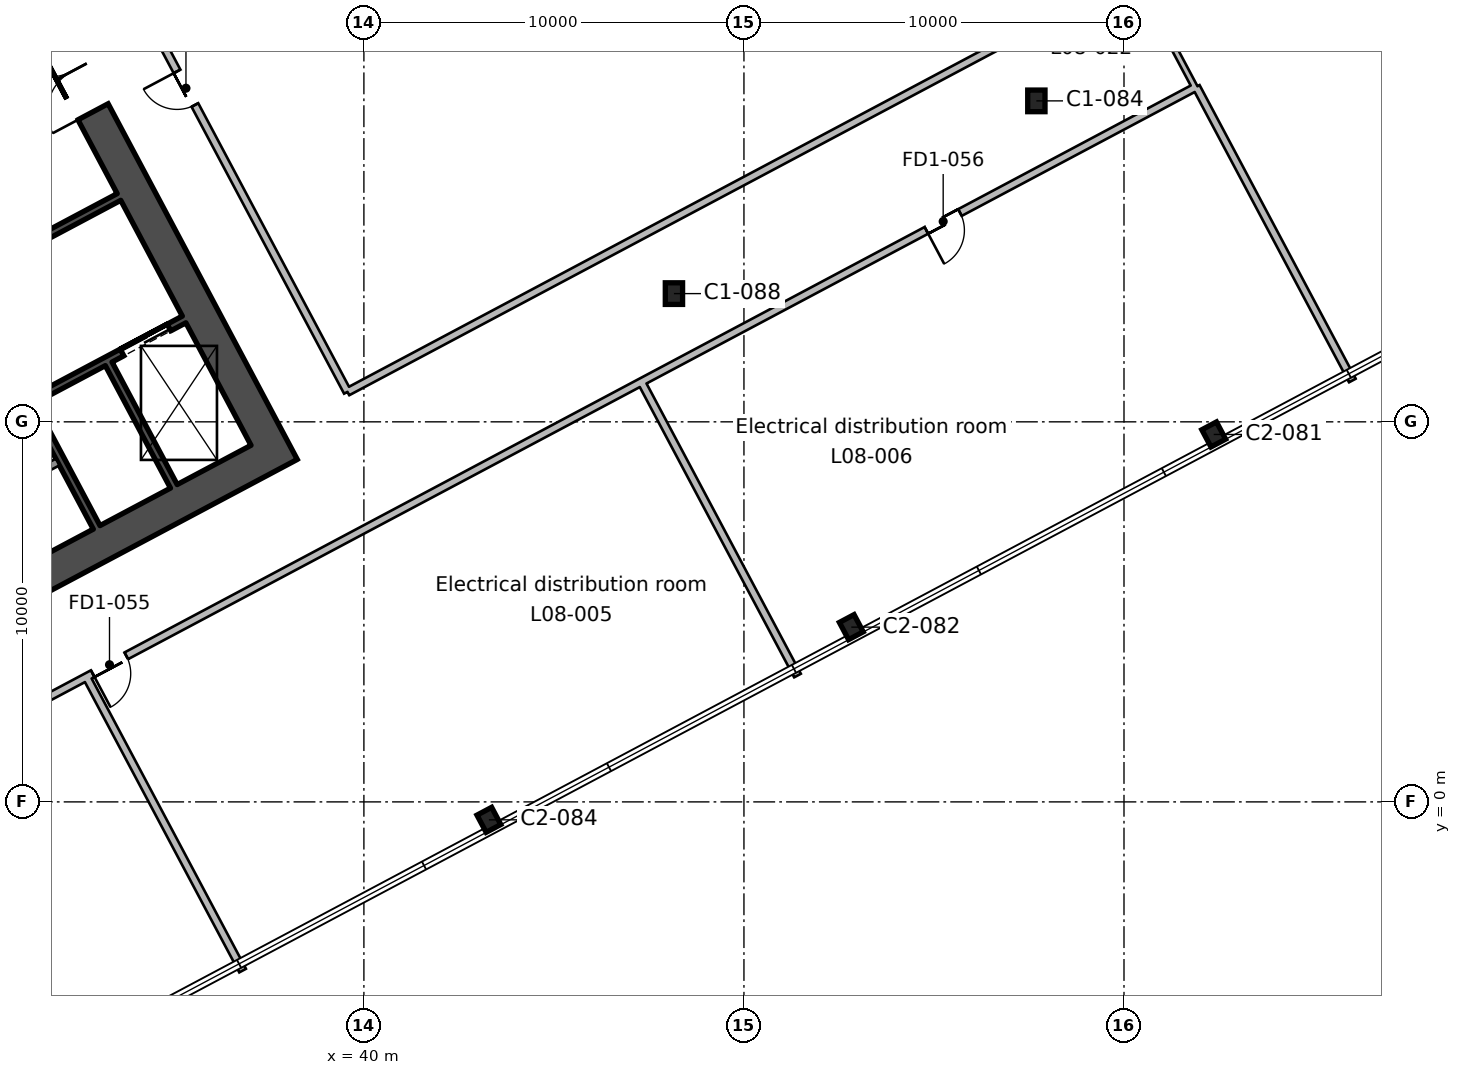
"""IFC4 building model, lengths in metres.
Left out: names, types, materials, properties, quantities, classifications, styles, units other than length and angle.
Written with IfcOpenShell. Run it as: python <this file> out.ifc"""

import sys

from ifc_helpers import new_model, si_unit, direction, frame, frame_2d, origin, origin_2d, place, context, subcontext, project, spatial, rectangle, i_section, extrude, element, fill, save


model = new_model("IFC4")
c1 = context("Model", 3, precision=1e-05, world=origin(), true_north=direction((0.0, 1.0)))
c2 = subcontext(c1, "Body", "Model", "MODEL_VIEW")
j1 = project(units=[si_unit("LENGTHUNIT", "METRE"), si_unit("PLANEANGLEUNIT", "RADIAN")], contexts=[c1])
p1 = place(None, origin())
s1 = spatial("IfcSite", under=j1, at=p1, CompositionType="ELEMENT")
p2 = place(p1, origin())
s2 = spatial("IfcBuilding", under=s1, at=p2, CompositionType="ELEMENT")
p3 = place(p2, frame((0.0, 0.0, 44.6)))
s3 = spatial("IfcBuildingStorey", under=s2, at=p3, CompositionType="ELEMENT", Elevation=44.6)
for number, where, z_axis, x_axis in (
    (1, (43.289, -0.472, 0.0), (0.0, 0.0, 1.0), (0.883, 0.469, 0.0)),
    (2, (52.825, 4.598, 0.0), (0.0, 0.0, 1.0), (0.883, 0.469, 0.0)),
    (3, (62.361, 9.668, 0.0), (0.0, 0.0, 1.0), (0.883, 0.469, 0.0)),
):
    element("IfcColumn", number, at=place(p3, frame(where, z_axis=z_axis, x_axis=x_axis)), inside=s3, PredefinedType="COLUMN", context=c2, shape_type="SweptSolid", body=[
        extrude(i_section(OverallWidth=0.437, OverallDepth=0.513, WebThickness=0.061, FlangeThickness=0.097, FilletRadius=0.015, at=origin_2d()), origin(), (0.0, 0.0, 1.0), 5.4),
    ])
for number, where, z_axis, x_axis in (
    (4, (48.158, 13.374, 0.0), (0.0, 0.0, 1.0), (1.0, 0.0, 0.0)),
    (5, (57.694, 18.445, 0.0), (0.0, 0.0, 1.0), (1.0, 0.0, 0.0)),
):
    element("IfcColumn", number, at=place(p3, frame(where, z_axis=z_axis, x_axis=x_axis)), inside=s3, PredefinedType="COLUMN", context=c2, shape_type="SweptSolid", body=[
        extrude(i_section(OverallWidth=0.455, OverallDepth=0.569, WebThickness=0.078, FlangeThickness=0.125, FilletRadius=0.015, at=origin_2d()), origin(), (0.0, 0.0, 1.0), 5.4),
    ])
p4 = place(p3, frame((37.849, 8.799, 0.0), z_axis=(0.0, 0.0, 1.0), x_axis=(-0.469465789982, 0.882950662289, 0.0)))
e6 = element("IfcWall", 6, at=p4, inside=s3, PredefinedType="SHEAR", context=c2, shape_type="SweptSolid", body=[
    extrude(rectangle(XDim=20.0, YDim=0.9, at=frame_2d((10.0, 0.0))), origin(), (0.0, 0.0, 1.0), 5.4),
])
p5 = place(p4, frame((10.6, 0.0, 0.0)))
e7 = element("IfcOpeningElement", 7, at=p5, cuts=e6, PredefinedType="OPENING", context=c2, shape_type="SweptSolid", body=[
    extrude(rectangle(XDim=2.4, YDim=2.4, at=frame_2d((1.2, 1.2))), frame((0.0, 0.46, 0.0), z_axis=(0.0, -1.0, 0.0), x_axis=(1.0, 0.0, 0.0)), (0.0, 0.0, 1.0), 0.92),
])
p6 = place(p3, frame((19.405, -0.498, 0.0), z_axis=(0.0, 0.0, 1.0), x_axis=(0.88294509198, 0.469476266226, 0.0)))
e8 = element("IfcWall", 8, at=p6, inside=s3, PredefinedType="SHEAR", context=c2, shape_type="SweptSolid", body=[
    extrude(rectangle(XDim=20.2, YDim=0.9, at=frame_2d((10.1, 0.0))), origin(), (0.0, 0.0, 1.0), 5.4),
])
p7 = place(p3, frame((32.968, 7.223, 0.0), z_axis=(0.0, 0.0, 1.0), x_axis=(-0.469480409012, 0.88294288918, 0.0)))
e9 = element("IfcWall", 9, at=p7, inside=s3, PredefinedType="SHEAR", context=c2, shape_type="SweptSolid", body=[
    extrude(rectangle(XDim=7.3, YDim=0.2, at=frame_2d((3.65, 0.0))), origin(), (0.0, 0.0, 1.0), 5.4),
])
p8 = place(p3, frame((34.999, 8.303, 0.0), z_axis=(0.0, 0.0, 1.0), x_axis=(-0.4694665462, 0.882950260207, 0.0)))
e10 = element("IfcWall", 10, at=p8, inside=s3, PredefinedType="SHEAR", context=c2, shape_type="SweptSolid", body=[
    extrude(rectangle(XDim=3.65, YDim=0.2, at=frame_2d((1.825, 0.0))), origin(), (0.0, 0.0, 1.0), 5.4),
])
p9 = place(p3, frame((27.349, 6.501, 0.0), z_axis=(0.0, 0.0, 1.0), x_axis=(0.882953967957, 0.469459572775, 0.0)))
e11 = element("IfcWall", 11, at=p9, inside=s3, PredefinedType="SOLIDWALL", context=c2, shape_type="SweptSolid", body=[
    extrude(rectangle(XDim=5.2, YDim=0.2, at=frame_2d((2.6, 0.0))), origin(), (0.0, 0.0, 1.0), 5.4),
])
p10 = place(p3, frame((31.296, 10.581, 0.0), z_axis=(0.0, 0.0, 1.0), x_axis=(0.882960433586, 0.469447412093, 0.0)))
e12 = element("IfcWall", 12, at=p10, inside=s3, PredefinedType="SHEAR", context=c2, shape_type="SweptSolid", body=[
    extrude(rectangle(XDim=4.5, YDim=0.2, at=frame_2d((2.25, 0.0))), origin(), (0.0, 0.0, 1.0), 5.4),
])
p11 = place(p10, frame((2.65, 0.0, 0.0)))
e13 = element("IfcOpeningElement", 13, at=p11, cuts=e12, PredefinedType="OPENING", context=c2, shape_type="SweptSolid", body=[
    extrude(rectangle(XDim=1.4, YDim=2.4, at=frame_2d((0.7, 1.2))), frame((0.0, 0.11, 0.0), z_axis=(0.0, -1.0, 0.0), x_axis=(1.0, 0.0, 0.0)), (0.0, 0.0, 1.0), 0.22),
])
p12 = place(p3, frame((24.726, 11.222, 0.0), z_axis=(0.0, 0.0, 1.0), x_axis=(0.882940221191, 0.469485426614, 0.0)))
e14 = element("IfcWall", 14, at=p12, inside=s3, PredefinedType="SHEAR", context=c2, shape_type="SweptSolid", body=[
    extrude(rectangle(XDim=10.0, YDim=0.2, at=frame_2d((5.0, 0.0))), origin(), (0.0, 0.0, 1.0), 5.4),
])
p13 = place(p12, frame((6.3, 0.0, 0.0)))
e15 = element("IfcOpeningElement", 15, at=p13, cuts=e14, PredefinedType="OPENING", context=c2, shape_type="SweptSolid", body=[
    extrude(rectangle(XDim=1.2, YDim=2.1, at=frame_2d((0.6, 1.05))), frame((0.0, 0.11, 0.0), z_axis=(0.0, -1.0, 0.0), x_axis=(1.0, 0.0, 0.0)), (0.0, 0.0, 1.0), 0.22),
])
p14 = place(p12, frame((0.36, 0.0, 0.0)))
e16 = element("IfcOpeningElement", 16, at=p14, cuts=e14, PredefinedType="OPENING", context=c2, shape_type="SweptSolid", body=[
    extrude(rectangle(XDim=0.9, YDim=2.1, at=frame_2d((0.45, 1.05))), frame((0.0, 0.11, 0.0), z_axis=(0.0, -1.0, 0.0), x_axis=(1.0, 0.0, 0.0)), (0.0, 0.0, 1.0), 0.22),
])
p15 = place(p12, frame((3.06, 0.0, 0.0)))
e17 = element("IfcOpeningElement", 17, at=p15, cuts=e14, PredefinedType="OPENING", context=c2, shape_type="SweptSolid", body=[
    extrude(rectangle(XDim=0.9, YDim=2.1, at=frame_2d((0.45, 1.05))), frame((0.0, 0.11, 0.0), z_axis=(0.0, -1.0, 0.0), x_axis=(1.0, 0.0, 0.0)), (0.0, 0.0, 1.0), 0.22),
])
p16 = place(p3, frame((47.301, 11.05, 0.0), z_axis=(0.0, 0.0, 1.0), x_axis=(-0.882949285086, -0.469468380155, 0.0)))
e18 = element("IfcWall", 18, at=p16, inside=s3, PredefinedType="PARTITIONING", context=c2, shape_type="SweptSolid", body=[
    extrude(rectangle(XDim=38.169, YDim=0.2, at=frame_2d((19.084, 0.0))), origin(), (0.0, 0.0, 1.0), 4.95),
])
p17 = place(p16, frame((18.55, 0.0, 0.0)))
e19 = element("IfcOpeningElement", 19, at=p17, cuts=e18, PredefinedType="OPENING", context=c2, shape_type="SweptSolid", body=[
    extrude(rectangle(XDim=1.0, YDim=2.1, at=frame_2d((0.5, 1.05))), frame((0.0, 0.11, 0.0), z_axis=(0.0, -1.0, 0.0), x_axis=(1.0, 0.0, 0.0)), (0.0, 0.0, 1.0), 0.22),
])
p18 = place(p16, frame((15.35, 0.0, 0.0)))
e20 = element("IfcOpeningElement", 20, at=p18, cuts=e18, PredefinedType="OPENING", context=c2, shape_type="SweptSolid", body=[
    extrude(rectangle(XDim=1.0, YDim=2.1, at=frame_2d((0.5, 1.05))), frame((0.0, 0.11, 0.0), z_axis=(0.0, -1.0, 0.0), x_axis=(1.0, 0.0, 0.0)), (0.0, 0.0, 1.0), 0.22),
])
p19 = place(p3, frame((36.809, -4.439, 0.0), z_axis=(0.0, 0.0, 1.0), x_axis=(-0.469482945701, 0.882941540361, 0.0)))
e21 = element("IfcWall", 21, at=p19, inside=s3, PredefinedType="PARTITIONING", context=c2, shape_type="SweptSolid", body=[
    extrude(rectangle(XDim=8.75, YDim=0.2, at=frame_2d((4.375, 0.0))), origin(), (0.0, 0.0, 1.0), 4.95),
])
p20 = place(p3, frame((47.301, 11.05, 0.0), z_axis=(0.0, 0.0, 1.0), x_axis=(0.469461194384, -0.882953105758, 0.0)))
e22 = element("IfcWall", 22, at=p20, inside=s3, PredefinedType="PARTITIONING", context=c2, shape_type="SweptSolid", body=[
    extrude(rectangle(XDim=8.75, YDim=0.2, at=frame_2d((4.375, 0.0))), origin(), (0.0, 0.0, 1.0), 4.95),
])
p21 = place(p3, frame((48.541, 15.56, 0.0), z_axis=(0.0, 0.0, 1.0), x_axis=(-0.882933406877, -0.469498241765, 0.0)))
e23 = element("IfcWall", 23, at=p21, inside=s3, PredefinedType="PARTITIONING", context=c2, shape_type="SweptSolid", body=[
    extrude(rectangle(XDim=10.164, YDim=0.2, at=frame_2d((5.082, 0.0))), origin(), (0.0, 0.0, 1.0), 4.95),
])
p22 = place(p3, frame((39.567, 10.788, 0.0), z_axis=(0.0, 0.0, 1.0), x_axis=(-0.469474056812, 0.882946266757, 0.0)))
e24 = element("IfcWall", 24, at=p22, inside=s3, PredefinedType="PARTITIONING", context=c2, shape_type="SweptSolid", body=[
    extrude(rectangle(XDim=18.101, YDim=0.2, at=frame_2d((9.05, 0.0))), origin(), (0.0, 0.0, 1.0), 4.95),
])
p23 = place(p22, frame((8.55, 0.0, 0.0)))
e25 = element("IfcOpeningElement", 25, at=p23, cuts=e24, PredefinedType="OPENING", context=c2, shape_type="SweptSolid", body=[
    extrude(rectangle(XDim=1.0, YDim=2.1, at=frame_2d((0.5, 1.05))), frame((0.0, 0.11, 0.0), z_axis=(0.0, -1.0, 0.0), x_axis=(1.0, 0.0, 0.0)), (0.0, 0.0, 1.0), 0.22),
])
p24 = place(p3, frame((57.27, 20.201, 0.0), z_axis=(0.0, 0.0, 1.0), x_axis=(-0.882965394181, -0.469438081837, 0.0)))
e26 = element("IfcWall", 26, at=p24, inside=s3, PredefinedType="PARTITIONING", context=c2, shape_type="SweptSolid", body=[
    extrude(rectangle(XDim=9.886, YDim=0.2, at=frame_2d((4.943, 0.0))), origin(), (0.0, 0.0, 1.0), 4.95),
])
p25 = place(p3, frame((48.576, 11.728, 0.0), z_axis=(0.0, 0.0, 1.0), x_axis=(-0.882918621496, -0.469526045939, 0.0)))
e27 = element("IfcWall", 27, at=p25, inside=s3, PredefinedType="PARTITIONING", context=c2, shape_type="SweptSolid", body=[
    extrude(rectangle(XDim=1.444, YDim=0.2, at=frame_2d((0.722, 0.0))), origin(), (0.0, 0.0, 1.0), 4.95),
])
p26 = place(p3, frame((48.576, 11.728, 0.0), z_axis=(0.0, 0.0, 1.0), x_axis=(0.88294872662, 0.469469430486, 0.0)))
e28 = element("IfcWall", 28, at=p26, inside=s3, PredefinedType="PARTITIONING", context=c2, shape_type="SweptSolid", body=[
    extrude(rectangle(XDim=15.091, YDim=0.2, at=frame_2d((7.546, 0.0))), origin(), (0.0, 0.0, 1.0), 4.95),
])
p27 = place(p26, frame((7.05, 0.0, 0.0)))
e29 = element("IfcOpeningElement", 29, at=p27, cuts=e28, PredefinedType="OPENING", context=c2, shape_type="SweptSolid", body=[
    extrude(rectangle(XDim=1.0, YDim=2.1, at=frame_2d((0.5, 1.05))), frame((0.0, 0.11, 0.0), z_axis=(0.0, -1.0, 0.0), x_axis=(1.0, 0.0, 0.0)), (0.0, 0.0, 1.0), 0.22),
])
p28 = place(p3, frame((61.901, 18.813, 0.0), z_axis=(0.0, 0.0, 1.0), x_axis=(0.469482945701, -0.882941540361, 0.0)))
e30 = element("IfcWall", 30, at=p28, inside=s3, PredefinedType="PARTITIONING", context=c2, shape_type="SweptSolid", body=[
    extrude(rectangle(XDim=8.75, YDim=0.2, at=frame_2d((4.375, 0.0))), origin(), (0.0, 0.0, 1.0), 4.95),
])
p29 = place(p3, frame((51.795, 37.739, 0.0), z_axis=(0.0, 0.0, 1.0), x_axis=(0.469480492676, -0.882942844694, 0.0)))
e31 = element("IfcWall", 31, at=p29, inside=s3, PredefinedType="PARTITIONING", context=c2, shape_type="SweptSolid", body=[
    extrude(rectangle(XDim=21.456, YDim=0.15, at=frame_2d((10.728, 0.0))), origin(), (0.0, 0.0, 1.0), 4.95),
])
p30 = place(p5, origin())
e32 = element("IfcDoor", 32, at=p30, inside=s3, OperationType="DOUBLE_DOOR_SINGLE_SWING", PredefinedType="DOOR", context=c2, shape_type="SweptSolid", body=[
    extrude(rectangle(XDim=2.4, YDim=2.4, at=frame_2d((1.2, 1.2))), frame((0.0, 0.025, 0.0), z_axis=(0.0, -1.0, 0.0), x_axis=(1.0, 0.0, 0.0)), (0.0, 0.0, 1.0), 0.05),
])
fill(e7, e32)
p31 = place(p11, origin())
e33 = element("IfcDoor", 33, at=p31, inside=s3, OperationType="DOUBLE_DOOR_SLIDING", PredefinedType="DOOR", context=c2, shape_type="SweptSolid", body=[
    extrude(rectangle(XDim=1.4, YDim=2.4, at=frame_2d((0.7, 1.2))), frame((0.0, 0.025, 0.0), z_axis=(0.0, -1.0, 0.0), x_axis=(1.0, 0.0, 0.0)), (0.0, 0.0, 1.0), 0.05),
])
fill(e13, e33)
p32 = place(p18, origin())
e34 = element("IfcDoor", 34, at=p32, inside=s3, OperationType="SINGLE_SWING_RIGHT", PredefinedType="DOOR", context=c2, shape_type="SweptSolid", body=[
    extrude(rectangle(XDim=1.0, YDim=2.1, at=frame_2d((0.5, 1.05))), frame((0.0, 0.025, 0.0), z_axis=(0.0, -1.0, 0.0), x_axis=(1.0, 0.0, 0.0)), (0.0, 0.0, 1.0), 0.05),
])
fill(e20, e34)
p33 = place(p27, frame((1.0, 0.0, 0.0), z_axis=(0.0, 0.0, 1.0), x_axis=(-1.0, 0.0, 0.0)))
e35 = element("IfcDoor", 35, at=p33, inside=s3, OperationType="SINGLE_SWING_RIGHT", PredefinedType="DOOR", context=c2, shape_type="SweptSolid", body=[
    extrude(rectangle(XDim=1.0, YDim=2.1, at=frame_2d((0.5, 1.05))), frame((0.0, 0.025, 0.0), z_axis=(0.0, -1.0, 0.0), x_axis=(1.0, 0.0, 0.0)), (0.0, 0.0, 1.0), 0.05),
])
fill(e29, e35)
p34 = place(p23, origin())
e36 = element("IfcDoor", 36, at=p34, inside=s3, OperationType="SINGLE_SWING_RIGHT", PredefinedType="DOOR", context=c2, shape_type="SweptSolid", body=[
    extrude(rectangle(XDim=1.0, YDim=2.1, at=frame_2d((0.5, 1.05))), frame((0.0, 0.025, 0.0), z_axis=(0.0, -1.0, 0.0), x_axis=(1.0, 0.0, 0.0)), (0.0, 0.0, 1.0), 0.05),
])
fill(e25, e36)
save(model, sys.argv[1])
